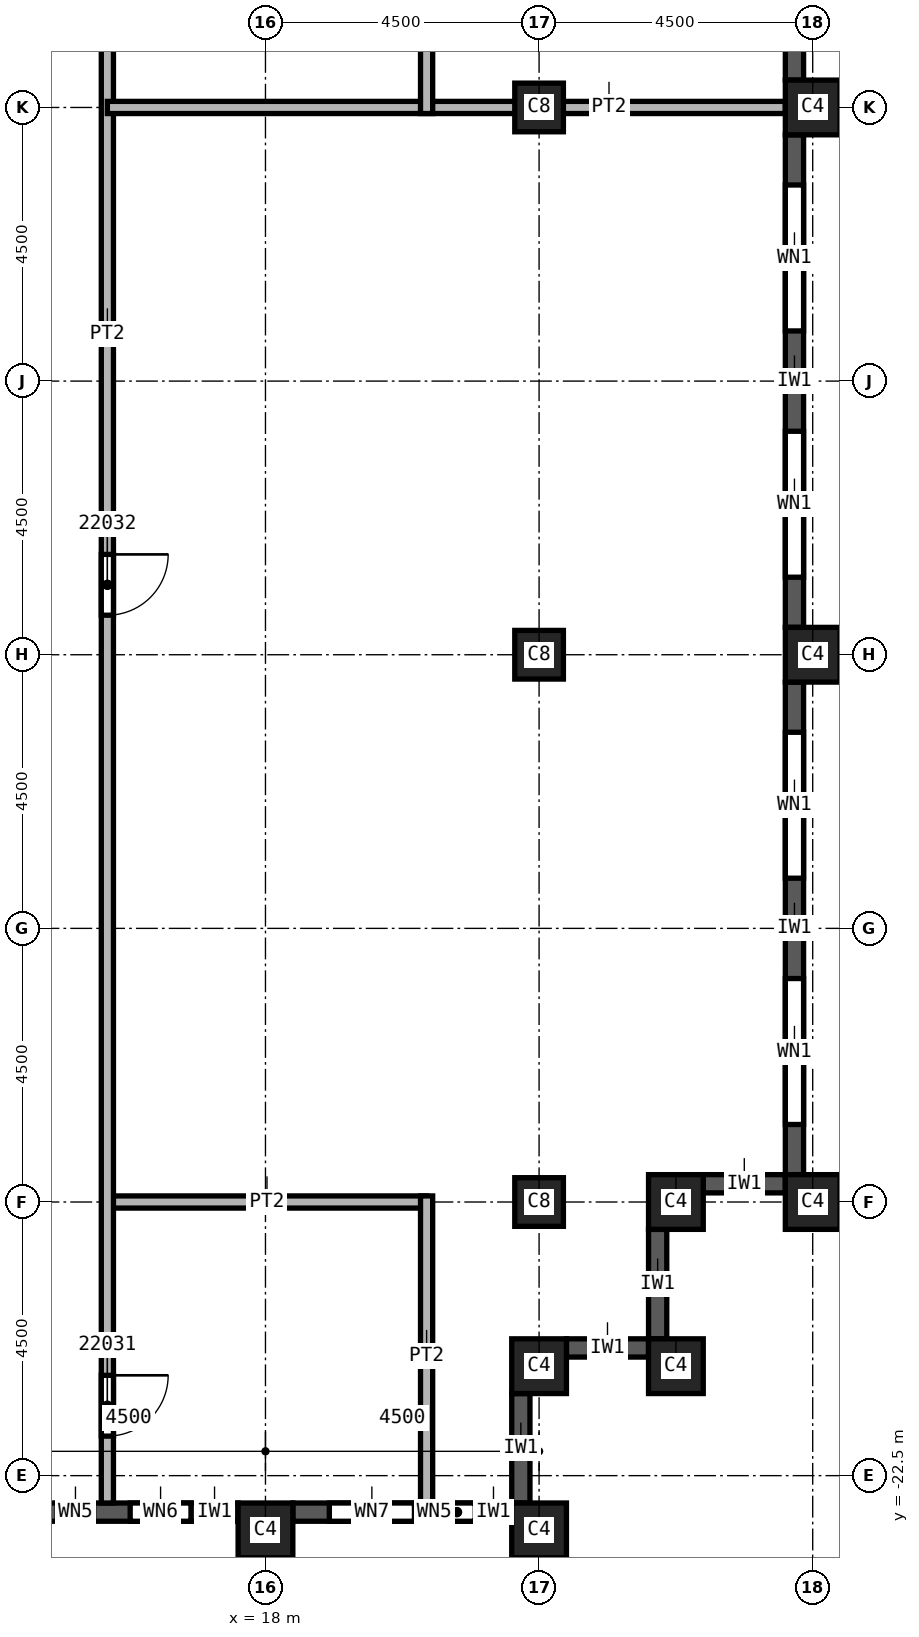
"""IFC4 building model, lengths in metres.
Left out: names, types, materials, properties, quantities, classifications, styles, units other than length and angle.
Written with IfcOpenShell. Run it as: python <this file> out.ifc"""

import sys

from ifc_helpers import new_model, si_unit, direction, frame, frame_2d, origin, origin_2d, place, context, subcontext, project, spatial, rectangle, extrude, element, fill, save


model = new_model("IFC4")
c1 = context("Model", 3, precision=1e-05, world=origin(), true_north=direction((0.0, 1.0)))
c2 = subcontext(c1, "Body", "Model", "MODEL_VIEW")
j1 = project(units=[si_unit("LENGTHUNIT", "METRE"), si_unit("PLANEANGLEUNIT", "RADIAN")], contexts=[c1])
p1 = place(None, origin())
s1 = spatial("IfcSite", under=j1, at=p1, CompositionType="ELEMENT")
p2 = place(p1, origin())
s2 = spatial("IfcBuilding", under=s1, at=p2, CompositionType="ELEMENT")
p3 = place(p2, frame((0.0, 0.0, 316.0)))
s3 = spatial("IfcBuildingStorey", under=s2, at=p3, CompositionType="ELEMENT", Elevation=316.0)
for number, where, z_axis, x_axis in (
    (1, (22.5, 0.0, 0.0), (0.0, 0.0, 1.0), (1.0, 0.0, 0.0)),
    (2, (22.5, -9.0, 0.0), (0.0, 0.0, 1.0), (1.0, 0.0, 0.0)),
    (3, (22.5, -18.0, 0.0), (0.0, 0.0, 1.0), (1.0, 0.0, 0.0)),
):
    element("IfcColumn", number, at=place(p3, frame(where, z_axis=z_axis, x_axis=x_axis)), inside=s3, PredefinedType="COLUMN", context=c2, shape_type="SweptSolid", body=[
        extrude(rectangle(XDim=0.8, YDim=0.8, at=origin_2d()), origin(), (0.0, 0.0, 1.0), 3.59),
    ])
for number, where, z_axis, x_axis in (
    (4, (27.0, 0.0, 0.0), (0.0, 0.0, 1.0), (0.0, 1.0, 0.0)),
    (5, (27.0, -9.0, 0.0), (0.0, 0.0, 1.0), (0.0, 1.0, 0.0)),
    (6, (27.0, -18.0, 0.0), (0.0, 0.0, 1.0), (0.0, 1.0, 0.0)),
    (7, (18.0, -23.4, 0.0), (0.0, 0.0, 1.0), (1.0, 0.0, 0.0)),
    (8, (22.5, -23.4, 0.0), (0.0, 0.0, 1.0), (1.0, 0.0, 0.0)),
    (9, (22.5, -20.7, 0.0), (0.0, 0.0, 1.0), (1.0, 0.0, 0.0)),
    (10, (24.75, -20.7, 0.0), (0.0, 0.0, 1.0), (1.0, 0.0, 0.0)),
    (11, (24.75, -18.0, 0.0), (0.0, 0.0, 1.0), (1.0, 0.0, 0.0)),
):
    element("IfcColumn", number, at=place(p3, frame(where, z_axis=z_axis, x_axis=x_axis)), inside=s3, PredefinedType="COLUMN", context=c2, shape_type="SweptSolid", body=[
        extrude(rectangle(XDim=0.9, YDim=0.9, at=origin_2d()), origin(), (0.0, 0.0, 1.0), 3.59),
    ])
p4 = place(p3, frame((13.95, -23.1, 0.0), z_axis=(0.0, 0.0, 1.0), x_axis=(1.0, 0.0, 0.0)))
e12 = element("IfcWall", 12, at=p4, inside=s3, PredefinedType="SOLIDWALL", context=c2, shape_type="SweptSolid", body=[
    extrude(rectangle(XDim=3.6, YDim=0.3, at=frame_2d((1.8, 0.0))), origin(), (0.0, 0.0, 1.0), 2.99),
])
p5 = place(p4, frame((0.625, 0.0, 0.8)))
e13 = element("IfcOpeningElement", 13, at=p5, cuts=e12, PredefinedType="OPENING", context=c2, shape_type="SweptSolid", body=[
    extrude(rectangle(XDim=0.6, YDim=1.95, at=frame_2d((0.3, 0.975))), frame((0.0, 0.15, 0.0), z_axis=(0.0, -1.0, 0.0), x_axis=(1.0, 0.0, 0.0)), (0.0, 0.0, 1.0), 0.3),
])
p6 = place(p4, frame((1.825, 0.0, 0.8)))
e14 = element("IfcOpeningElement", 14, at=p6, cuts=e12, PredefinedType="OPENING", context=c2, shape_type="SweptSolid", body=[
    extrude(rectangle(XDim=1.0, YDim=1.95, at=frame_2d((0.5, 0.975))), frame((0.0, 0.15, 0.0), z_axis=(0.0, -1.0, 0.0), x_axis=(1.0, 0.0, 0.0)), (0.0, 0.0, 1.0), 0.3),
])
p7 = place(p3, frame((18.45, -23.1, 0.0), z_axis=(0.0, 0.0, 1.0), x_axis=(1.0, 0.0, 0.0)))
e15 = element("IfcWall", 15, at=p7, inside=s3, PredefinedType="SOLIDWALL", context=c2, shape_type="SweptSolid", body=[
    extrude(rectangle(XDim=3.6, YDim=0.3, at=frame_2d((1.8, 0.0))), origin(), (0.0, 0.0, 1.0), 2.99),
])
p8 = place(p7, frame((0.6, 0.0, 0.8)))
e16 = element("IfcOpeningElement", 16, at=p8, cuts=e15, PredefinedType="OPENING", context=c2, shape_type="SweptSolid", body=[
    extrude(rectangle(XDim=1.4, YDim=1.95, at=frame_2d((0.7, 0.975))), frame((0.0, 0.15, 0.0), z_axis=(0.0, -1.0, 0.0), x_axis=(1.0, 0.0, 0.0)), (0.0, 0.0, 1.0), 0.3),
])
p9 = place(p7, frame((2.4, 0.0, 0.8)))
e17 = element("IfcOpeningElement", 17, at=p9, cuts=e15, PredefinedType="OPENING", context=c2, shape_type="SweptSolid", body=[
    extrude(rectangle(XDim=0.6, YDim=1.95, at=frame_2d((0.3, 0.975))), frame((0.0, 0.15, 0.0), z_axis=(0.0, -1.0, 0.0), x_axis=(1.0, 0.0, 0.0)), (0.0, 0.0, 1.0), 0.3),
])
p10 = place(p3, frame((22.2, -22.95, 0.0), z_axis=(0.0, 0.0, 1.0), x_axis=(0.0, 1.0, 0.0)))
e18 = element("IfcWall", 18, at=p10, inside=s3, PredefinedType="SOLIDWALL", context=c2, shape_type="SweptSolid", body=[
    extrude(rectangle(XDim=1.8, YDim=0.3, at=frame_2d((0.9, 0.0))), origin(), (0.0, 0.0, 1.0), 2.99),
])
p11 = place(p3, frame((22.95, -20.4, 0.0), z_axis=(0.0, 0.0, 1.0), x_axis=(1.0, 0.0, 0.0)))
e19 = element("IfcWall", 19, at=p11, inside=s3, PredefinedType="SOLIDWALL", context=c2, shape_type="SweptSolid", body=[
    extrude(rectangle(XDim=1.35, YDim=0.3, at=frame_2d((0.675, 0.0))), origin(), (0.0, 0.0, 1.0), 2.99),
])
p12 = place(p3, frame((24.45, -20.25, 0.0), z_axis=(0.0, 0.0, 1.0), x_axis=(0.0, 1.0, 0.0)))
e20 = element("IfcWall", 20, at=p12, inside=s3, PredefinedType="SOLIDWALL", context=c2, shape_type="SweptSolid", body=[
    extrude(rectangle(XDim=1.8, YDim=0.3, at=frame_2d((0.9, 0.0))), origin(), (0.0, 0.0, 1.0), 2.99),
])
p13 = place(p3, frame((25.2, -17.7, 0.0), z_axis=(0.0, 0.0, 1.0), x_axis=(1.0, 0.0, 0.0)))
e21 = element("IfcWall", 21, at=p13, inside=s3, PredefinedType="SOLIDWALL", context=c2, shape_type="SweptSolid", body=[
    extrude(rectangle(XDim=1.35, YDim=0.3, at=frame_2d((0.675, 0.0))), origin(), (0.0, 0.0, 1.0), 2.99),
])
p14 = place(p3, frame((26.7, -17.55, 0.0), z_axis=(0.0, 0.0, 1.0), x_axis=(0.0, 1.0, 0.0)))
e22 = element("IfcWall", 22, at=p14, inside=s3, PredefinedType="SOLIDWALL", context=c2, shape_type="SweptSolid", body=[
    extrude(rectangle(XDim=8.1, YDim=0.3, at=frame_2d((4.05, 0.0))), origin(), (0.0, 0.0, 1.0), 2.99),
])
p15 = place(p14, frame((0.825, 0.0, 0.8)))
e23 = element("IfcOpeningElement", 23, at=p15, cuts=e22, PredefinedType="OPENING", context=c2, shape_type="SweptSolid", body=[
    extrude(rectangle(XDim=2.4, YDim=1.95, at=frame_2d((1.2, 0.975))), frame((0.0, 0.15, 0.0), z_axis=(0.0, -1.0, 0.0), x_axis=(1.0, 0.0, 0.0)), (0.0, 0.0, 1.0), 0.3),
])
p16 = place(p14, frame((4.875, 0.0, 0.8)))
e24 = element("IfcOpeningElement", 24, at=p16, cuts=e22, PredefinedType="OPENING", context=c2, shape_type="SweptSolid", body=[
    extrude(rectangle(XDim=2.4, YDim=1.95, at=frame_2d((1.2, 0.975))), frame((0.0, 0.15, 0.0), z_axis=(0.0, -1.0, 0.0), x_axis=(1.0, 0.0, 0.0)), (0.0, 0.0, 1.0), 0.3),
])
p17 = place(p3, frame((26.7, -8.55, 0.0), z_axis=(0.0, 0.0, 1.0), x_axis=(0.0, 1.0, 0.0)))
e25 = element("IfcWall", 25, at=p17, inside=s3, PredefinedType="SOLIDWALL", context=c2, shape_type="SweptSolid", body=[
    extrude(rectangle(XDim=8.1, YDim=0.3, at=frame_2d((4.05, 0.0))), origin(), (0.0, 0.0, 1.0), 2.99),
])
p18 = place(p17, frame((0.825, 0.0, 0.8)))
e26 = element("IfcOpeningElement", 26, at=p18, cuts=e25, PredefinedType="OPENING", context=c2, shape_type="SweptSolid", body=[
    extrude(rectangle(XDim=2.4, YDim=1.95, at=frame_2d((1.2, 0.975))), frame((0.0, 0.15, 0.0), z_axis=(0.0, -1.0, 0.0), x_axis=(1.0, 0.0, 0.0)), (0.0, 0.0, 1.0), 0.3),
])
p19 = place(p17, frame((4.875, 0.0, 0.8)))
e27 = element("IfcOpeningElement", 27, at=p19, cuts=e25, PredefinedType="OPENING", context=c2, shape_type="SweptSolid", body=[
    extrude(rectangle(XDim=2.4, YDim=1.95, at=frame_2d((1.2, 0.975))), frame((0.0, 0.15, 0.0), z_axis=(0.0, -1.0, 0.0), x_axis=(1.0, 0.0, 0.0)), (0.0, 0.0, 1.0), 0.3),
])
p20 = place(p3, frame((26.7, 0.45, 0.0), z_axis=(0.0, 0.0, 1.0), x_axis=(0.0, 1.0, 0.0)))
e28 = element("IfcWall", 28, at=p20, inside=s3, PredefinedType="SOLIDWALL", context=c2, shape_type="SweptSolid", body=[
    extrude(rectangle(XDim=8.1, YDim=0.3, at=frame_2d((4.05, 0.0))), origin(), (0.0, 0.0, 1.0), 2.99),
])
p21 = place(p20, frame((0.825, 0.0, 0.8)))
e29 = element("IfcOpeningElement", 29, at=p21, cuts=e28, PredefinedType="OPENING", context=c2, shape_type="SweptSolid", body=[
    extrude(rectangle(XDim=2.4, YDim=1.95, at=frame_2d((1.2, 0.975))), frame((0.0, 0.15, 0.0), z_axis=(0.0, -1.0, 0.0), x_axis=(1.0, 0.0, 0.0)), (0.0, 0.0, 1.0), 0.3),
])
p22 = place(p20, frame((4.875, 0.0, 0.8)))
e30 = element("IfcOpeningElement", 30, at=p22, cuts=e28, PredefinedType="OPENING", context=c2, shape_type="SweptSolid", body=[
    extrude(rectangle(XDim=2.4, YDim=1.95, at=frame_2d((1.2, 0.975))), frame((0.0, 0.15, 0.0), z_axis=(0.0, -1.0, 0.0), x_axis=(1.0, 0.0, 0.0)), (0.0, 0.0, 1.0), 0.3),
])
p23 = place(p3, frame((15.4, -18.0, 0.0), z_axis=(0.0, 0.0, 1.0), x_axis=(1.0, 0.0, 0.0)))
e31 = element("IfcWall", 31, at=p23, inside=s3, PredefinedType="PARTITIONING", context=c2, shape_type="SweptSolid", body=[
    extrude(rectangle(XDim=5.25, YDim=0.2, at=frame_2d((2.625, 0.0))), origin(), (0.0, 0.0, 1.0), 3.59),
])
p24 = place(p3, frame((15.4, 22.95, 0.0), z_axis=(0.0, 0.0, 1.0), x_axis=(0.0, -1.0, 0.0)))
e32 = element("IfcWall", 32, at=p24, inside=s3, PredefinedType="PARTITIONING", context=c2, shape_type="SweptSolid", body=[
    extrude(rectangle(XDim=45.9, YDim=0.2, at=frame_2d((22.95, 0.0))), origin(), (0.0, 0.0, 1.0), 3.59),
])
p25 = place(p24, frame((15.0, 0.0, 0.0)))
e33 = element("IfcOpeningElement", 33, at=p25, cuts=e32, PredefinedType="OPENING", context=c2, shape_type="SweptSolid", body=[
    extrude(rectangle(XDim=1.0, YDim=2.1, at=frame_2d((0.5, 1.05))), frame((0.0, 0.1, 0.0), z_axis=(0.0, -1.0, 0.0), x_axis=(1.0, 0.0, 0.0)), (0.0, 0.0, 1.0), 0.2),
])
p26 = place(p24, frame((8.05, 0.0, 0.0)))
e34 = element("IfcOpeningElement", 34, at=p26, cuts=e32, PredefinedType="OPENING", context=c2, shape_type="SweptSolid", body=[
    extrude(rectangle(XDim=1.0, YDim=2.1, at=frame_2d((0.5, 1.05))), frame((0.0, 0.1, 0.0), z_axis=(0.0, -1.0, 0.0), x_axis=(1.0, 0.0, 0.0)), (0.0, 0.0, 1.0), 0.2),
])
p27 = place(p24, frame((43.8, 0.0, 0.0)))
e35 = element("IfcOpeningElement", 35, at=p27, cuts=e32, PredefinedType="OPENING", context=c2, shape_type="SweptSolid", body=[
    extrude(rectangle(XDim=1.0, YDim=2.1, at=frame_2d((0.5, 1.05))), frame((0.0, 0.1, 0.0), z_axis=(0.0, -1.0, 0.0), x_axis=(1.0, 0.0, 0.0)), (0.0, 0.0, 1.0), 0.2),
])
p28 = place(p24, frame((30.3, 0.0, 0.0)))
e36 = element("IfcOpeningElement", 36, at=p28, cuts=e32, PredefinedType="OPENING", context=c2, shape_type="SweptSolid", body=[
    extrude(rectangle(XDim=1.0, YDim=2.1, at=frame_2d((0.5, 1.05))), frame((0.0, 0.1, 0.0), z_axis=(0.0, -1.0, 0.0), x_axis=(1.0, 0.0, 0.0)), (0.0, 0.0, 1.0), 0.2),
])
p29 = place(p3, frame((20.65, -17.9, 0.0), z_axis=(0.0, 0.0, 1.0), x_axis=(0.0, -1.0, 0.0)))
e37 = element("IfcWall", 37, at=p29, inside=s3, PredefinedType="PARTITIONING", context=c2, shape_type="SweptSolid", body=[
    extrude(rectangle(XDim=5.05, YDim=0.2, at=frame_2d((2.525, 0.0))), origin(), (0.0, 0.0, 1.0), 3.59),
])
p30 = place(p3, frame((26.55, 0.0, 0.0), z_axis=(0.0, 0.0, 1.0), x_axis=(-1.0, 0.0, 0.0)))
e38 = element("IfcWall", 38, at=p30, inside=s3, PredefinedType="PARTITIONING", context=c2, shape_type="SweptSolid", body=[
    extrude(rectangle(XDim=11.15, YDim=0.2, at=frame_2d((5.575, 0.0))), origin(), (0.0, 0.0, 1.0), 3.59),
])
p31 = place(p3, frame((20.65, 22.95, 0.0), z_axis=(0.0, 0.0, 1.0), x_axis=(0.0, -1.0, 0.0)))
e39 = element("IfcWall", 39, at=p31, inside=s3, PredefinedType="PARTITIONING", context=c2, shape_type="SweptSolid", body=[
    extrude(rectangle(XDim=23.05, YDim=0.2, at=frame_2d((11.525, 0.0))), origin(), (0.0, 0.0, 1.0), 3.59),
])
p32 = place(p31, frame((14.7, 0.0, 0.0)))
e40 = element("IfcOpeningElement", 40, at=p32, cuts=e39, PredefinedType="OPENING", context=c2, shape_type="SweptSolid", body=[
    extrude(rectangle(XDim=1.0, YDim=2.1, at=frame_2d((0.5, 1.05))), frame((0.0, 0.1, 0.0), z_axis=(0.0, -1.0, 0.0), x_axis=(1.0, 0.0, 0.0)), (0.0, 0.0, 1.0), 0.2),
])
p33 = place(p31, frame((7.15, 0.0, 0.0)))
e41 = element("IfcOpeningElement", 41, at=p33, cuts=e39, PredefinedType="OPENING", context=c2, shape_type="SweptSolid", body=[
    extrude(rectangle(XDim=1.0, YDim=2.1, at=frame_2d((0.5, 1.05))), frame((0.0, 0.1, 0.0), z_axis=(0.0, -1.0, 0.0), x_axis=(1.0, 0.0, 0.0)), (0.0, 0.0, 1.0), 0.2),
])
p34 = place(p15, origin())
e42 = element("IfcWindow", 42, at=p34, inside=s3, PartitioningType="SINGLE_PANEL", PredefinedType="WINDOW", context=c2, shape_type="SweptSolid", body=[
    extrude(rectangle(XDim=2.4, YDim=1.95, at=frame_2d((1.2, 0.975))), frame((0.0, 0.03, 0.0), z_axis=(0.0, -1.0, 0.0), x_axis=(1.0, 0.0, 0.0)), (0.0, 0.0, 1.0), 0.06),
])
fill(e23, e42)
p35 = place(p16, origin())
e43 = element("IfcWindow", 43, at=p35, inside=s3, PartitioningType="SINGLE_PANEL", PredefinedType="WINDOW", context=c2, shape_type="SweptSolid", body=[
    extrude(rectangle(XDim=2.4, YDim=1.95, at=frame_2d((1.2, 0.975))), frame((0.0, 0.03, 0.0), z_axis=(0.0, -1.0, 0.0), x_axis=(1.0, 0.0, 0.0)), (0.0, 0.0, 1.0), 0.06),
])
fill(e24, e43)
p36 = place(p18, origin())
e44 = element("IfcWindow", 44, at=p36, inside=s3, PartitioningType="SINGLE_PANEL", PredefinedType="WINDOW", context=c2, shape_type="SweptSolid", body=[
    extrude(rectangle(XDim=2.4, YDim=1.95, at=frame_2d((1.2, 0.975))), frame((0.0, 0.03, 0.0), z_axis=(0.0, -1.0, 0.0), x_axis=(1.0, 0.0, 0.0)), (0.0, 0.0, 1.0), 0.06),
])
fill(e26, e44)
p37 = place(p19, origin())
e45 = element("IfcWindow", 45, at=p37, inside=s3, PartitioningType="SINGLE_PANEL", PredefinedType="WINDOW", context=c2, shape_type="SweptSolid", body=[
    extrude(rectangle(XDim=2.4, YDim=1.95, at=frame_2d((1.2, 0.975))), frame((0.0, 0.03, 0.0), z_axis=(0.0, -1.0, 0.0), x_axis=(1.0, 0.0, 0.0)), (0.0, 0.0, 1.0), 0.06),
])
fill(e27, e45)
p38 = place(p27, origin())
e46 = element("IfcDoor", 46, at=p38, inside=s3, OperationType="SINGLE_SWING_RIGHT", PredefinedType="DOOR", context=c2, shape_type="SweptSolid", body=[
    extrude(rectangle(XDim=1.0, YDim=2.1, at=frame_2d((0.5, 1.05))), frame((0.0, 0.025, 0.0), z_axis=(0.0, -1.0, 0.0), x_axis=(1.0, 0.0, 0.0)), (0.0, 0.0, 1.0), 0.05),
])
fill(e35, e46)
p39 = place(p28, origin())
e47 = element("IfcDoor", 47, at=p39, inside=s3, OperationType="SINGLE_SWING_LEFT", PredefinedType="DOOR", context=c2, shape_type="SweptSolid", body=[
    extrude(rectangle(XDim=1.0, YDim=2.1, at=frame_2d((0.5, 1.05))), frame((0.0, 0.025, 0.0), z_axis=(0.0, -1.0, 0.0), x_axis=(1.0, 0.0, 0.0)), (0.0, 0.0, 1.0), 0.05),
])
fill(e36, e47)
p40 = place(p5, origin())
e48 = element("IfcWindow", 48, at=p40, inside=s3, PartitioningType="SINGLE_PANEL", PredefinedType="WINDOW", context=c2, shape_type="SweptSolid", body=[
    extrude(rectangle(XDim=0.6, YDim=1.95, at=frame_2d((0.3, 0.975))), frame((0.0, 0.03, 0.0), z_axis=(0.0, -1.0, 0.0), x_axis=(1.0, 0.0, 0.0)), (0.0, 0.0, 1.0), 0.06),
])
fill(e13, e48)
p41 = place(p6, origin())
e49 = element("IfcWindow", 49, at=p41, inside=s3, PartitioningType="SINGLE_PANEL", PredefinedType="WINDOW", context=c2, shape_type="SweptSolid", body=[
    extrude(rectangle(XDim=1.0, YDim=1.95, at=frame_2d((0.5, 0.975))), frame((0.0, 0.03, 0.0), z_axis=(0.0, -1.0, 0.0), x_axis=(1.0, 0.0, 0.0)), (0.0, 0.0, 1.0), 0.06),
])
fill(e14, e49)
p42 = place(p8, origin())
e50 = element("IfcWindow", 50, at=p42, inside=s3, PartitioningType="SINGLE_PANEL", PredefinedType="WINDOW", context=c2, shape_type="SweptSolid", body=[
    extrude(rectangle(XDim=1.4, YDim=1.95, at=frame_2d((0.7, 0.975))), frame((0.0, 0.03, 0.0), z_axis=(0.0, -1.0, 0.0), x_axis=(1.0, 0.0, 0.0)), (0.0, 0.0, 1.0), 0.06),
])
fill(e16, e50)
p43 = place(p9, origin())
e51 = element("IfcWindow", 51, at=p43, inside=s3, PartitioningType="SINGLE_PANEL", PredefinedType="WINDOW", context=c2, shape_type="SweptSolid", body=[
    extrude(rectangle(XDim=0.6, YDim=1.95, at=frame_2d((0.3, 0.975))), frame((0.0, 0.03, 0.0), z_axis=(0.0, -1.0, 0.0), x_axis=(1.0, 0.0, 0.0)), (0.0, 0.0, 1.0), 0.06),
])
fill(e17, e51)
save(model, sys.argv[1])
